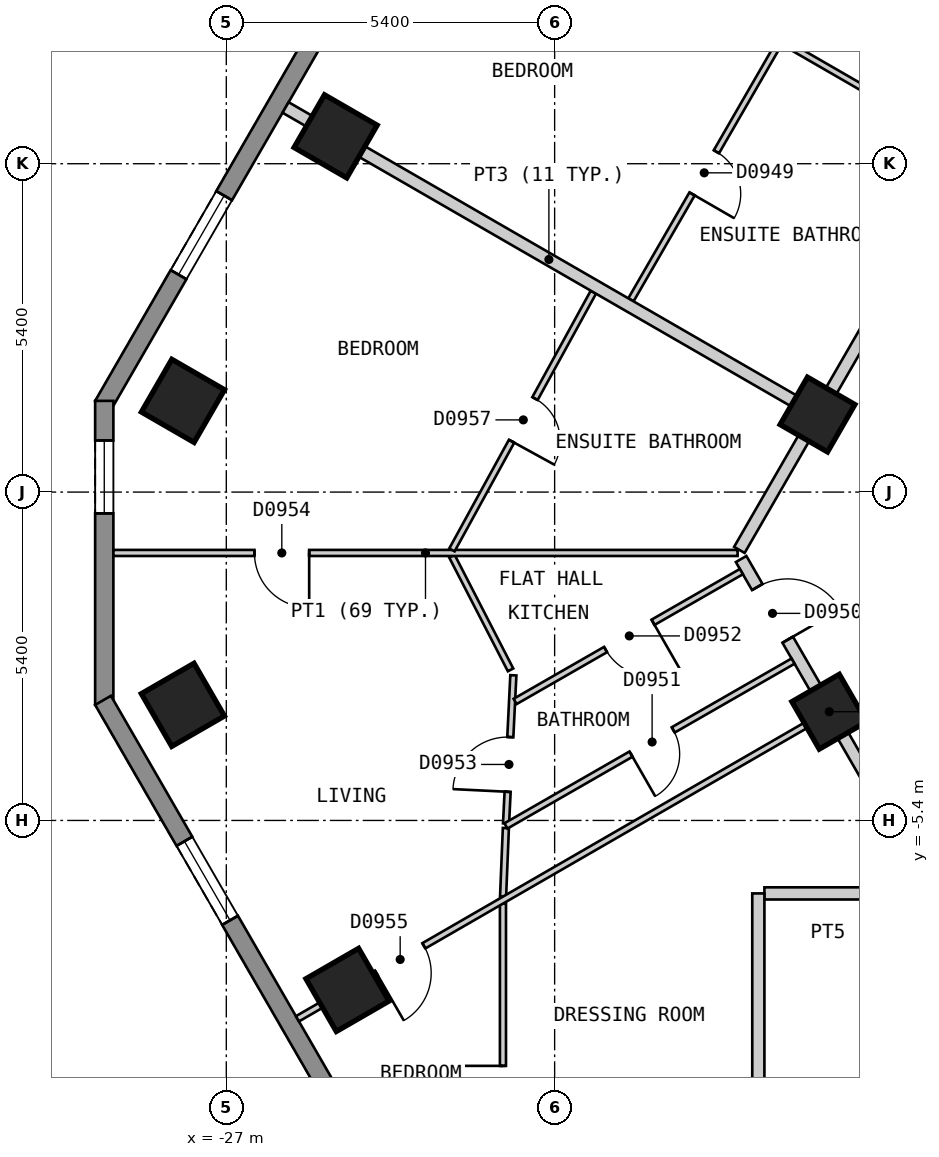
"""IFC4 building model, lengths in metres.
Left out: names, types, materials, properties, quantities, classifications, styles, units other than length and angle.
Written with IfcOpenShell. Run it as: python <this file> out.ifc"""

import sys

from ifc_helpers import new_model, si_unit, direction, frame, frame_2d, origin, origin_2d, place, context, subcontext, project, spatial, polyline, rectangle, outline, extrude, element, fill, save


model = new_model("IFC4")
c1 = context("Model", 3, precision=1e-05, world=origin(), true_north=direction((0.0, 1.0)))
c2 = subcontext(c1, "Body", "Model", "MODEL_VIEW")
j1 = project(units=[si_unit("LENGTHUNIT", "METRE"), si_unit("PLANEANGLEUNIT", "RADIAN")], contexts=[c1])
p1 = place(None, origin())
s1 = spatial("IfcSite", under=j1, at=p1, CompositionType="ELEMENT")
p2 = place(p1, origin())
s2 = spatial("IfcBuilding", under=s1, at=p2, CompositionType="ELEMENT")
p3 = place(p2, frame((0.0, 0.0, 90.0)))
s3 = spatial("IfcBuildingStorey", under=s2, at=p3, CompositionType="ELEMENT", Elevation=90.0)
for number, where, z_axis, x_axis in (
    (1, (-25.202, 5.85, 0.0), (0.0, 0.0, 1.0), (-0.5, -0.866, 0.0)),
    (2, (-27.713, 1.5, 0.0), (0.0, 0.0, 1.0), (-0.5, -0.866, 0.0)),
    (3, (-27.714, -3.499, 0.0), (0.0, 0.0, 1.0), (0.5, -0.866, 0.0)),
    (4, (-25.007, -8.187, 0.0), (0.0, 0.0, 1.0), (0.5, -0.866, 0.0)),
):
    element("IfcColumn", number, at=place(p3, frame(where, z_axis=z_axis, x_axis=x_axis)), inside=s3, PredefinedType="COLUMN", context=c2, shape_type="SweptSolid", body=[
        extrude(rectangle(XDim=1.0, YDim=1.0, at=origin_2d()), origin(), (0.0, 0.0, 1.0), 3.0),
    ])
for number, where, z_axis, x_axis in (
    (5, (-17.083, -3.612, 0.0), (0.0, 0.0, 1.0), (0.5, -0.866, 0.0)),
    (6, (-17.277, 1.275, 0.0), (0.0, 0.0, 1.0), (-0.5, -0.866, 0.0)),
):
    element("IfcColumn", number, at=place(p3, frame(where, z_axis=z_axis, x_axis=x_axis)), inside=s3, PredefinedType="COLUMN", context=c2, shape_type="SweptSolid", body=[
        extrude(rectangle(XDim=0.9, YDim=0.9, at=origin_2d()), origin(), (0.0, 0.0, 1.0), 3.0),
    ])
p4 = place(p3, frame((-15.747, 24.425, 0.0), z_axis=(0.0, 0.0, 1.0), x_axis=(-0.500027479704, -0.866009537788, 0.0)))
e7 = element("IfcWall", 7, at=p4, inside=s3, PredefinedType="SOLIDWALL", context=c2, shape_type="SweptSolid", body=[
    extrude(outline(polyline([(0.0, -0.15), (26.559, -0.15), (26.478, 0.15), (0.08, 0.15), (0.0, -0.15)])), origin(), (0.0, 0.0, 1.0), 2.7),
])
p5 = place(p4, frame((2.483, 0.0, 0.15)))
e8 = element("IfcOpeningElement", 8, at=p5, cuts=e7, PredefinedType="OPENING", context=c2, shape_type="SweptSolid", body=[
    extrude(rectangle(XDim=1.5, YDim=2.1, at=frame_2d((0.75, 1.05))), frame((0.0, 0.16, 0.0), z_axis=(0.0, -1.0, 0.0), x_axis=(1.0, 0.0, 0.0)), (0.0, 0.0, 1.0), 0.32),
])
p6 = place(p4, frame((7.506, 0.0, 0.15)))
e9 = element("IfcOpeningElement", 9, at=p6, cuts=e7, PredefinedType="OPENING", context=c2, shape_type="SweptSolid", body=[
    extrude(rectangle(XDim=1.5, YDim=2.1, at=frame_2d((0.75, 1.05))), frame((0.0, 0.16, 0.0), z_axis=(0.0, -1.0, 0.0), x_axis=(1.0, 0.0, 0.0)), (0.0, 0.0, 1.0), 0.32),
])
p7 = place(p4, frame((12.529, 0.0, 0.15)))
e10 = element("IfcOpeningElement", 10, at=p7, cuts=e7, PredefinedType="OPENING", context=c2, shape_type="SweptSolid", body=[
    extrude(rectangle(XDim=1.5, YDim=2.1, at=frame_2d((0.75, 1.05))), frame((0.0, 0.16, 0.0), z_axis=(0.0, -1.0, 0.0), x_axis=(1.0, 0.0, 0.0)), (0.0, 0.0, 1.0), 0.32),
])
p8 = place(p4, frame((17.552, 0.0, 0.15)))
e11 = element("IfcOpeningElement", 11, at=p8, cuts=e7, PredefinedType="OPENING", context=c2, shape_type="SweptSolid", body=[
    extrude(rectangle(XDim=1.5, YDim=2.1, at=frame_2d((0.75, 1.05))), frame((0.0, 0.16, 0.0), z_axis=(0.0, -1.0, 0.0), x_axis=(1.0, 0.0, 0.0)), (0.0, 0.0, 1.0), 0.32),
])
p9 = place(p4, frame((22.575, 0.0, 0.15)))
e12 = element("IfcOpeningElement", 12, at=p9, cuts=e7, PredefinedType="OPENING", context=c2, shape_type="SweptSolid", body=[
    extrude(rectangle(XDim=1.5, YDim=2.1, at=frame_2d((0.75, 1.05))), frame((0.0, 0.16, 0.0), z_axis=(0.0, -1.0, 0.0), x_axis=(1.0, 0.0, 0.0)), (0.0, 0.0, 1.0), 0.32),
])
p10 = place(p3, frame((-29.007, 1.5, 0.0), z_axis=(0.0, 0.0, 1.0), x_axis=(0.0, -1.0, 0.0)))
e13 = element("IfcWall", 13, at=p10, inside=s3, PredefinedType="SOLIDWALL", context=c2, shape_type="SweptSolid", body=[
    extrude(outline(polyline([(0.0, -0.15), (5.0, -0.15), (4.92, 0.15), (0.08, 0.15), (0.0, -0.15)])), origin(), (0.0, 0.0, 1.0), 2.7),
])
p11 = place(p10, frame((0.65, 0.0, 0.15)))
e14 = element("IfcOpeningElement", 14, at=p11, cuts=e13, PredefinedType="OPENING", context=c2, shape_type="SweptSolid", body=[
    extrude(rectangle(XDim=1.2, YDim=2.1, at=frame_2d((0.6, 1.05))), frame((0.0, 0.16, 0.0), z_axis=(0.0, -1.0, 0.0), x_axis=(1.0, 0.0, 0.0)), (0.0, 0.0, 1.0), 0.32),
])
p12 = place(p3, frame((-29.027, -3.425, 0.0), z_axis=(0.0, 0.0, 1.0), x_axis=(0.500035407905, -0.866004960056, 0.0)))
e15 = element("IfcWall", 15, at=p12, inside=s3, PredefinedType="SOLIDWALL", context=c2, shape_type="SweptSolid", body=[
    extrude(outline(polyline([(0.0, -0.15), (23.094, -0.15), (23.014, 0.15), (0.08, 0.15), (0.0, -0.15)])), origin(), (0.0, 0.0, 1.0), 2.7),
])
p13 = place(p12, frame((2.677, 0.0, 0.15)))
e16 = element("IfcOpeningElement", 16, at=p13, cuts=e15, PredefinedType="OPENING", context=c2, shape_type="SweptSolid", body=[
    extrude(rectangle(XDim=1.5, YDim=2.1, at=frame_2d((0.75, 1.05))), frame((0.0, 0.16, 0.0), z_axis=(0.0, -1.0, 0.0), x_axis=(1.0, 0.0, 0.0)), (0.0, 0.0, 1.0), 0.32),
])
p14 = place(p12, frame((8.091, 0.0, 0.15)))
e17 = element("IfcOpeningElement", 17, at=p14, cuts=e15, PredefinedType="OPENING", context=c2, shape_type="SweptSolid", body=[
    extrude(rectangle(XDim=1.5, YDim=2.1, at=frame_2d((0.75, 1.05))), frame((0.0, 0.16, 0.0), z_axis=(0.0, -1.0, 0.0), x_axis=(1.0, 0.0, 0.0)), (0.0, 0.0, 1.0), 0.32),
])
p15 = place(p12, frame((13.504, 0.0, 0.15)))
e18 = element("IfcOpeningElement", 18, at=p15, cuts=e15, PredefinedType="OPENING", context=c2, shape_type="SweptSolid", body=[
    extrude(rectangle(XDim=1.5, YDim=2.1, at=frame_2d((0.75, 1.05))), frame((0.0, 0.16, 0.0), z_axis=(0.0, -1.0, 0.0), x_axis=(1.0, 0.0, 0.0)), (0.0, 0.0, 1.0), 0.32),
])
p16 = place(p12, frame((18.917, 0.0, 0.15)))
e19 = element("IfcOpeningElement", 19, at=p16, cuts=e15, PredefinedType="OPENING", context=c2, shape_type="SweptSolid", body=[
    extrude(rectangle(XDim=1.5, YDim=2.1, at=frame_2d((0.75, 1.05))), frame((0.0, 0.16, 0.0), z_axis=(0.0, -1.0, 0.0), x_axis=(1.0, 0.0, 0.0)), (0.0, 0.0, 1.0), 0.32),
])
p17 = place(p3, frame((-18.533, -1.101, 0.0), z_axis=(0.0, 0.0, 1.0), x_axis=(0.500022085096, -0.866012652573, 0.0)))
e20 = element("IfcWall", 20, at=p17, inside=s3, PredefinedType="PARTITIONING", context=c2, shape_type="SweptSolid", body=[
    extrude(rectangle(XDim=6.066, YDim=0.2, at=frame_2d((3.033, 0.0))), origin(), (0.0, 0.0, 1.0), 2.7),
])
p18 = place(p17, frame((0.532, 0.0, 0.0)))
e21 = element("IfcOpeningElement", 21, at=p18, cuts=e20, PredefinedType="OPENING", context=c2, shape_type="SweptSolid", body=[
    extrude(rectangle(XDim=1.0, YDim=2.1, at=frame_2d((0.5, 1.05))), frame((0.0, 0.11, 0.0), z_axis=(0.0, -1.0, 0.0), x_axis=(1.0, 0.0, 0.0)), (0.0, 0.0, 1.0), 0.22),
])
p19 = place(p3, frame((-18.15, -6.6, 0.0), z_axis=(0.0, 0.0, 1.0), x_axis=(1.0, 0.0, 0.0)))
e22 = element("IfcWall", 22, at=p19, inside=s3, PredefinedType="PARTITIONING", context=c2, shape_type="SweptSolid", body=[
    extrude(rectangle(XDim=2.649, YDim=0.2, at=frame_2d((1.324, 0.0))), origin(), (0.0, 0.0, 1.0), 2.7),
])
p20 = place(p3, frame((-18.562, -0.951, 0.0), z_axis=(0.0, 0.0, 1.0), x_axis=(0.499987097491, 0.866032852923, 0.0)))
e23 = element("IfcWall", 23, at=p20, inside=s3, PredefinedType="PARTITIONING", context=c2, shape_type="SweptSolid", body=[
    extrude(rectangle(XDim=20.15, YDim=0.2, at=frame_2d((10.075, 0.0))), origin(), (0.0, 0.0, 1.0), 2.7),
])
p21 = place(p20, frame((14.627, 0.0, 0.0)))
e24 = element("IfcOpeningElement", 24, at=p21, cuts=e23, PredefinedType="OPENING", context=c2, shape_type="SweptSolid", body=[
    extrude(rectangle(XDim=1.0, YDim=2.1, at=frame_2d((0.5, 1.05))), frame((0.0, 0.11, 0.0), z_axis=(0.0, -1.0, 0.0), x_axis=(1.0, 0.0, 0.0)), (0.0, 0.0, 1.0), 0.22),
])
p22 = place(p20, frame((9.604, 0.0, 0.0)))
e25 = element("IfcOpeningElement", 25, at=p22, cuts=e23, PredefinedType="OPENING", context=c2, shape_type="SweptSolid", body=[
    extrude(rectangle(XDim=1.0, YDim=2.1, at=frame_2d((0.5, 1.05))), frame((0.0, 0.11, 0.0), z_axis=(0.0, -1.0, 0.0), x_axis=(1.0, 0.0, 0.0)), (0.0, 0.0, 1.0), 0.22),
])
p23 = place(p3, frame((-18.25, -14.386, 0.0), z_axis=(0.0, 0.0, 1.0), x_axis=(0.0, 1.0, 0.0)))
e26 = element("IfcWall", 26, at=p23, inside=s3, PredefinedType="PARTITIONING", context=c2, shape_type="SweptSolid", body=[
    extrude(rectangle(XDim=7.786, YDim=0.2, at=frame_2d((3.893, 0.0))), origin(), (0.0, 0.0, 1.0), 2.7),
])
p24 = place(p23, frame((0.34, 0.0, 0.0)))
e27 = element("IfcOpeningElement", 27, at=p24, cuts=e26, PredefinedType="OPENING", context=c2, shape_type="SweptSolid", body=[
    extrude(rectangle(XDim=1.0, YDim=2.1, at=frame_2d((0.5, 1.05))), frame((0.0, 0.11, 0.0), z_axis=(0.0, -1.0, 0.0), x_axis=(1.0, 0.0, 0.0)), (0.0, 0.0, 1.0), 0.22),
])
p25 = place(p3, frame((-23.289, -1.054, 0.0), z_axis=(0.0, 0.0, 1.0), x_axis=(0.458226112305, -0.888835659726, 0.0)))
e28 = element("IfcWall", 28, at=p25, inside=s3, PredefinedType="PARTITIONING", context=c2, shape_type="SweptSolid", body=[
    extrude(rectangle(XDim=2.104, YDim=0.1, at=frame_2d((1.052, 0.0))), origin(), (0.0, 0.0, 1.0), 2.7),
])
p26 = place(p3, frame((-23.513, 10.675, 0.0), z_axis=(0.0, 0.0, 1.0), x_axis=(0.866041268327, -0.499972520799, 0.0)))
e29 = element("IfcWall", 29, at=p26, inside=s3, PredefinedType="PARTITIONING", context=c2, shape_type="SweptSolid", body=[
    extrude(rectangle(XDim=10.0, YDim=0.1, at=frame_2d((5.0, 0.0))), origin(), (0.0, 0.0, 1.0), 2.7),
])
p27 = place(p26, frame((4.325, 0.0, 0.0)))
e30 = element("IfcOpeningElement", 30, at=p27, cuts=e29, PredefinedType="OPENING", context=c2, shape_type="SweptSolid", body=[
    extrude(rectangle(XDim=0.9, YDim=2.1, at=frame_2d((0.45, 1.05))), frame((0.0, 0.06, 0.0), z_axis=(0.0, -1.0, 0.0), x_axis=(1.0, 0.0, 0.0)), (0.0, 0.0, 1.0), 0.12),
])
p28 = place(p3, frame((-28.857, -1.001, 0.0), z_axis=(0.0, 0.0, 1.0), x_axis=(1.0, 0.0, 0.0)))
e31 = element("IfcWall", 31, at=p28, inside=s3, PredefinedType="PARTITIONING", context=c2, shape_type="SweptSolid", body=[
    extrude(rectangle(XDim=10.266, YDim=0.1, at=frame_2d((5.133, 0.0))), origin(), (0.0, 0.0, 1.0), 2.7),
])
p29 = place(p28, frame((2.32, 0.0, 0.0)))
e32 = element("IfcOpeningElement", 32, at=p29, cuts=e31, PredefinedType="OPENING", context=c2, shape_type="SweptSolid", body=[
    extrude(rectangle(XDim=0.9, YDim=2.1, at=frame_2d((0.45, 1.05))), frame((0.0, 0.06, 0.0), z_axis=(0.0, -1.0, 0.0), x_axis=(1.0, 0.0, 0.0)), (0.0, 0.0, 1.0), 0.12),
])
p30 = place(p3, frame((-20.345, 3.162, 0.0), z_axis=(0.0, 0.0, 1.0), x_axis=(0.499943653708, 0.866057932887, 0.0)))
e33 = element("IfcWall", 33, at=p30, inside=s3, PredefinedType="PARTITIONING", context=c2, shape_type="SweptSolid", body=[
    extrude(rectangle(XDim=4.873, YDim=0.1, at=frame_2d((2.436, 0.0))), origin(), (0.0, 0.0, 1.0), 2.7),
])
p31 = place(p30, frame((2.011, 0.0, 0.0)))
e34 = element("IfcOpeningElement", 34, at=p31, cuts=e33, PredefinedType="OPENING", context=c2, shape_type="SweptSolid", body=[
    extrude(rectangle(XDim=0.8, YDim=2.1, at=frame_2d((0.4, 1.05))), frame((0.0, 0.06, 0.0), z_axis=(0.0, -1.0, 0.0), x_axis=(1.0, 0.0, 0.0)), (0.0, 0.0, 1.0), 0.12),
])
p32 = place(p3, frame((-23.289, -0.951, 0.0), z_axis=(0.0, 0.0, 1.0), x_axis=(0.481164463081, 0.876630343684, 0.0)))
e35 = element("IfcWall", 35, at=p32, inside=s3, PredefinedType="PARTITIONING", context=c2, shape_type="SweptSolid", body=[
    extrude(rectangle(XDim=4.834, YDim=0.1, at=frame_2d((2.417, 0.0))), origin(), (0.0, 0.0, 1.0), 2.7),
])
p33 = place(p32, frame((2.039, 0.0, 0.0)))
e36 = element("IfcOpeningElement", 36, at=p33, cuts=e35, PredefinedType="OPENING", context=c2, shape_type="SweptSolid", body=[
    extrude(rectangle(XDim=0.8, YDim=2.1, at=frame_2d((0.4, 1.05))), frame((0.0, 0.06, 0.0), z_axis=(0.0, -1.0, 0.0), x_axis=(1.0, 0.0, 0.0)), (0.0, 0.0, 1.0), 0.12),
])
p34 = place(p3, frame((-22.399, -5.45, 0.0), z_axis=(0.0, 0.0, 1.0), x_axis=(0.049129140995, 0.998792434646, 0.0)))
e37 = element("IfcWall", 37, at=p34, inside=s3, PredefinedType="PARTITIONING", context=c2, shape_type="SweptSolid", body=[
    extrude(rectangle(XDim=2.44, YDim=0.1, at=frame_2d((1.22, 0.0))), origin(), (0.0, 0.0, 1.0), 2.7),
])
p35 = place(p34, frame((0.522, 0.0, 0.0)))
e38 = element("IfcOpeningElement", 38, at=p35, cuts=e37, PredefinedType="OPENING", context=c2, shape_type="SweptSolid", body=[
    extrude(rectangle(XDim=0.9, YDim=2.1, at=frame_2d((0.45, 1.05))), frame((0.0, 0.06, 0.0), z_axis=(0.0, -1.0, 0.0), x_axis=(1.0, 0.0, 0.0)), (0.0, 0.0, 1.0), 0.12),
])
p36 = place(p3, frame((-22.448, -6.651, 0.0), z_axis=(0.0, 0.0, 1.0), x_axis=(0.040729401597, 0.99917021365, 0.0)))
e39 = element("IfcWall", 39, at=p36, inside=s3, PredefinedType="PARTITIONING", context=c2, shape_type="SweptSolid", body=[
    extrude(rectangle(XDim=1.127, YDim=0.1, at=frame_2d((0.563, 0.0))), origin(), (0.0, 0.0, 1.0), 2.7),
])
p37 = place(p3, frame((-22.45, -12.846, 0.0), z_axis=(0.0, 0.0, 1.0), x_axis=(0.0, 1.0, 0.0)))
e40 = element("IfcWall", 40, at=p37, inside=s3, PredefinedType="PARTITIONING", context=c2, shape_type="SweptSolid", body=[
    extrude(rectangle(XDim=6.078, YDim=0.1, at=frame_2d((3.039, 0.0))), origin(), (0.0, 0.0, 1.0), 2.7),
])
p38 = place(p37, frame((2.61, 0.0, 0.0)))
e41 = element("IfcOpeningElement", 41, at=p38, cuts=e40, PredefinedType="OPENING", context=c2, shape_type="SweptSolid", body=[
    extrude(rectangle(XDim=0.8, YDim=2.1, at=frame_2d((0.4, 1.05))), frame((0.0, 0.06, 0.0), z_axis=(0.0, -1.0, 0.0), x_axis=(1.0, 0.0, 0.0)), (0.0, 0.0, 1.0), 0.12),
])
p39 = place(p3, frame((-25.83, -8.662, 0.0), z_axis=(0.0, 0.0, 1.0), x_axis=(0.866022959057, 0.500004234368, 0.0)))
e42 = element("IfcWall", 42, at=p39, inside=s3, PredefinedType="PARTITIONING", context=c2, shape_type="SweptSolid", body=[
    extrude(rectangle(XDim=10.0, YDim=0.1, at=frame_2d((5.0, 0.0))), origin(), (0.0, 0.0, 1.0), 2.7),
])
p40 = place(p39, frame((1.501, 0.0, 0.0)))
e43 = element("IfcOpeningElement", 43, at=p40, cuts=e42, PredefinedType="OPENING", context=c2, shape_type="SweptSolid", body=[
    extrude(rectangle(XDim=0.9, YDim=2.1, at=frame_2d((0.45, 1.05))), frame((0.0, 0.06, 0.0), z_axis=(0.0, -1.0, 0.0), x_axis=(1.0, 0.0, 0.0)), (0.0, 0.0, 1.0), 0.12),
])
p41 = place(p3, frame((-22.401, -5.49, 0.0), z_axis=(0.0, 0.0, 1.0), x_axis=(0.867314404256, 0.497760709749, 0.0)))
e44 = element("IfcWall", 44, at=p41, inside=s3, PredefinedType="PARTITIONING", context=c2, shape_type="SweptSolid", body=[
    extrude(rectangle(XDim=5.444, YDim=0.1, at=frame_2d((2.722, 0.0))), origin(), (0.0, 0.0, 1.0), 2.7),
])
p42 = place(p41, frame((2.372, 0.0, 0.0)))
e45 = element("IfcOpeningElement", 45, at=p42, cuts=e44, PredefinedType="OPENING", context=c2, shape_type="SweptSolid", body=[
    extrude(rectangle(XDim=0.8, YDim=2.1, at=frame_2d((0.4, 1.05))), frame((0.0, 0.06, 0.0), z_axis=(0.0, -1.0, 0.0), x_axis=(1.0, 0.0, 0.0)), (0.0, 0.0, 1.0), 0.12),
])
p43 = place(p3, frame((-22.25, -3.443, 0.0), z_axis=(0.0, 0.0, 1.0), x_axis=(0.867362741349, 0.497676476156, 0.0)))
e46 = element("IfcWall", 46, at=p43, inside=s3, PredefinedType="PARTITIONING", context=c2, shape_type="SweptSolid", body=[
    extrude(rectangle(XDim=4.29, YDim=0.1, at=frame_2d((2.145, 0.0))), origin(), (0.0, 0.0, 1.0), 2.7),
])
p44 = place(p43, frame((1.715, 0.0, 0.0)))
e47 = element("IfcOpeningElement", 47, at=p44, cuts=e46, PredefinedType="OPENING", context=c2, shape_type="SweptSolid", body=[
    extrude(rectangle(XDim=0.9, YDim=2.1, at=frame_2d((0.45, 1.05))), frame((0.0, 0.06, 0.0), z_axis=(0.0, -1.0, 0.0), x_axis=(1.0, 0.0, 0.0)), (0.0, 0.0, 1.0), 0.12),
])
p45 = place(p3, frame((-26.025, 6.325, 0.0), z_axis=(0.0, 0.0, 1.0), x_axis=(0.866041268327, -0.499972520799, 0.0)))
e48 = element("IfcWall", 48, at=p45, inside=s3, PredefinedType="PARTITIONING", context=c2, shape_type="SweptSolid", body=[
    extrude(rectangle(XDim=10.0, YDim=0.2, at=frame_2d((5.0, 0.0))), origin(), (0.0, 0.0, 1.0), 2.7),
])
p46 = place(p9, origin())
e49 = element("IfcWindow", 49, at=p46, inside=s3, PartitioningType="SINGLE_PANEL", PredefinedType="WINDOW", context=c2, shape_type="SweptSolid", body=[
    extrude(rectangle(XDim=1.5, YDim=2.1, at=frame_2d((0.75, 1.05))), frame((0.0, 0.03, 0.0), z_axis=(0.0, -1.0, 0.0), x_axis=(1.0, 0.0, 0.0)), (0.0, 0.0, 1.0), 0.06),
])
fill(e12, e49)
p47 = place(p11, origin())
e50 = element("IfcWindow", 50, at=p47, inside=s3, PartitioningType="SINGLE_PANEL", PredefinedType="WINDOW", context=c2, shape_type="SweptSolid", body=[
    extrude(rectangle(XDim=1.2, YDim=2.1, at=frame_2d((0.6, 1.05))), frame((0.0, 0.03, 0.0), z_axis=(0.0, -1.0, 0.0), x_axis=(1.0, 0.0, 0.0)), (0.0, 0.0, 1.0), 0.06),
])
fill(e14, e50)
p48 = place(p13, origin())
e51 = element("IfcWindow", 51, at=p48, inside=s3, PartitioningType="SINGLE_PANEL", PredefinedType="WINDOW", context=c2, shape_type="SweptSolid", body=[
    extrude(rectangle(XDim=1.5, YDim=2.1, at=frame_2d((0.75, 1.05))), frame((0.0, 0.03, 0.0), z_axis=(0.0, -1.0, 0.0), x_axis=(1.0, 0.0, 0.0)), (0.0, 0.0, 1.0), 0.06),
])
fill(e16, e51)
p49 = place(p31, origin())
e52 = element("IfcDoor", 52, at=p49, inside=s3, OperationType="SINGLE_SWING_LEFT", PredefinedType="DOOR", context=c2, shape_type="SweptSolid", body=[
    extrude(rectangle(XDim=0.8, YDim=2.1, at=frame_2d((0.4, 1.05))), frame((0.0, 0.025, 0.0), z_axis=(0.0, -1.0, 0.0), x_axis=(1.0, 0.0, 0.0)), (0.0, 0.0, 1.0), 0.05),
])
fill(e34, e52)
p50 = place(p18, origin())
e53 = element("IfcDoor", 53, at=p50, inside=s3, OperationType="SINGLE_SWING_RIGHT", PredefinedType="DOOR", context=c2, shape_type="SweptSolid", body=[
    extrude(rectangle(XDim=1.0, YDim=2.1, at=frame_2d((0.5, 1.05))), frame((0.0, 0.025, 0.0), z_axis=(0.0, -1.0, 0.0), x_axis=(1.0, 0.0, 0.0)), (0.0, 0.0, 1.0), 0.05),
])
fill(e21, e53)
p51 = place(p42, origin())
e54 = element("IfcDoor", 54, at=p51, inside=s3, OperationType="SINGLE_SWING_LEFT", PredefinedType="DOOR", context=c2, shape_type="SweptSolid", body=[
    extrude(rectangle(XDim=0.8, YDim=2.1, at=frame_2d((0.4, 1.05))), frame((0.0, 0.025, 0.0), z_axis=(0.0, -1.0, 0.0), x_axis=(1.0, 0.0, 0.0)), (0.0, 0.0, 1.0), 0.05),
])
fill(e45, e54)
p52 = place(p44, origin())
e55 = element("IfcDoor", 55, at=p52, inside=s3, OperationType="SINGLE_SWING_RIGHT", PredefinedType="DOOR", context=c2, shape_type="SweptSolid", body=[
    extrude(rectangle(XDim=0.9, YDim=2.1, at=frame_2d((0.45, 1.05))), frame((0.0, 0.025, 0.0), z_axis=(0.0, -1.0, 0.0), x_axis=(1.0, 0.0, 0.0)), (0.0, 0.0, 1.0), 0.05),
])
fill(e47, e55)
p53 = place(p35, origin())
e56 = element("IfcDoor", 56, at=p53, inside=s3, OperationType="SINGLE_SWING_LEFT", PredefinedType="DOOR", context=c2, shape_type="SweptSolid", body=[
    extrude(rectangle(XDim=0.9, YDim=2.1, at=frame_2d((0.45, 1.05))), frame((0.0, 0.025, 0.0), z_axis=(0.0, -1.0, 0.0), x_axis=(1.0, 0.0, 0.0)), (0.0, 0.0, 1.0), 0.05),
])
fill(e38, e56)
p54 = place(p29, origin())
e57 = element("IfcDoor", 57, at=p54, inside=s3, OperationType="SINGLE_SWING_RIGHT", PredefinedType="DOOR", context=c2, shape_type="SweptSolid", body=[
    extrude(rectangle(XDim=0.9, YDim=2.1, at=frame_2d((0.45, 1.05))), frame((0.0, 0.025, 0.0), z_axis=(0.0, -1.0, 0.0), x_axis=(1.0, 0.0, 0.0)), (0.0, 0.0, 1.0), 0.05),
])
fill(e32, e57)
p55 = place(p40, origin())
e58 = element("IfcDoor", 58, at=p55, inside=s3, OperationType="SINGLE_SWING_LEFT", PredefinedType="DOOR", context=c2, shape_type="SweptSolid", body=[
    extrude(rectangle(XDim=0.9, YDim=2.1, at=frame_2d((0.45, 1.05))), frame((0.0, 0.025, 0.0), z_axis=(0.0, -1.0, 0.0), x_axis=(1.0, 0.0, 0.0)), (0.0, 0.0, 1.0), 0.05),
])
fill(e43, e58)
p56 = place(p38, origin())
e59 = element("IfcDoor", 59, at=p56, inside=s3, OperationType="SINGLE_SWING_RIGHT", PredefinedType="DOOR", context=c2, shape_type="SweptSolid", body=[
    extrude(rectangle(XDim=0.8, YDim=2.1, at=frame_2d((0.4, 1.05))), frame((0.0, 0.025, 0.0), z_axis=(0.0, -1.0, 0.0), x_axis=(1.0, 0.0, 0.0)), (0.0, 0.0, 1.0), 0.05),
])
fill(e41, e59)
p57 = place(p33, origin())
e60 = element("IfcDoor", 60, at=p57, inside=s3, OperationType="SINGLE_SWING_LEFT", PredefinedType="DOOR", context=c2, shape_type="SweptSolid", body=[
    extrude(rectangle(XDim=0.8, YDim=2.1, at=frame_2d((0.4, 1.05))), frame((0.0, 0.025, 0.0), z_axis=(0.0, -1.0, 0.0), x_axis=(1.0, 0.0, 0.0)), (0.0, 0.0, 1.0), 0.05),
])
fill(e36, e60)
save(model, sys.argv[1])
